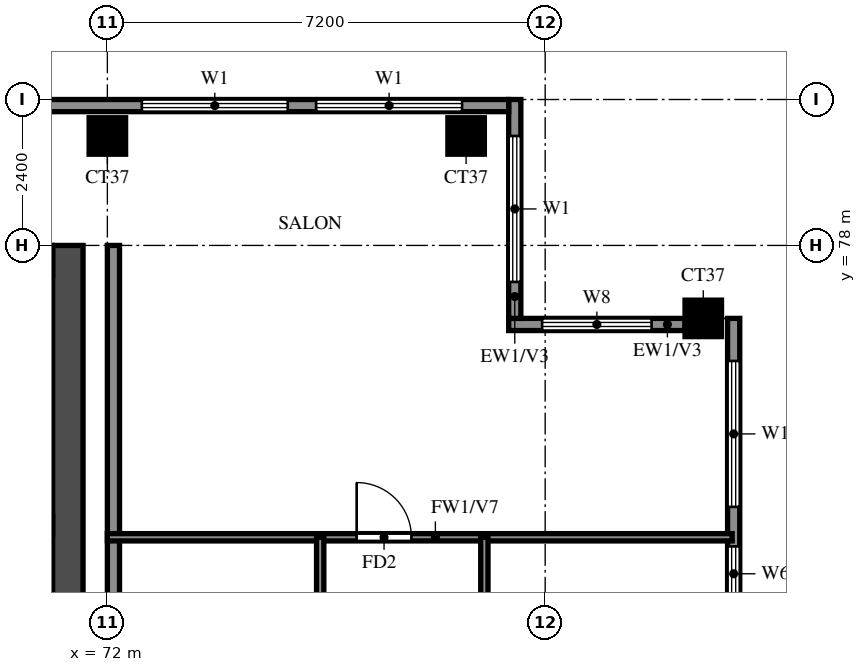
"""IFC4 building model, lengths in metres.
Left out: names, types, materials, properties, quantities, classifications, styles, units other than length and angle.
Written with IfcOpenShell. Run it as: python <this file> out.ifc"""

import sys

from ifc_helpers import new_model, si_unit, direction, frame, frame_2d, origin, origin_2d, place, context, subcontext, project, spatial, rectangle, extrude, source, transform, mapped, element, fill, save


model = new_model("IFC4")
c1 = context("Model", 3, precision=1e-05, world=origin(), true_north=direction((0.0, 1.0)))
c2 = subcontext(c1, "Body", "Model", "MODEL_VIEW")
j1 = project(units=[si_unit("LENGTHUNIT", "METRE"), si_unit("PLANEANGLEUNIT", "RADIAN")], contexts=[c1])
p1 = place(None, origin())
s1 = spatial("IfcSite", under=j1, at=p1, CompositionType="ELEMENT")
p2 = place(p1, origin())
s2 = spatial("IfcBuilding", under=s1, at=p2, CompositionType="ELEMENT")
p3 = place(p2, frame((0.0, 0.0, 253.5)))
s3 = spatial("IfcBuildingStorey", under=s2, at=p3, CompositionType="ELEMENT", Elevation=253.5)
m1 = source(origin(), c2, "Body", "SweptSolid", [
    extrude(rectangle(XDim=0.6, YDim=0.6, at=origin_2d()), origin(), (0.0, 0.0, 1.0), 3.22),
])
for number, where, z_axis, x_axis in (
    (1, (81.8, 76.8, 0.0), (0.0, 0.0, 1.0), (1.0, 0.0, 0.0)),
    (2, (72.0, 79.8, 0.0), (0.0, 0.0, 1.0), (1.0, 0.0, 0.0)),
    (3, (77.9, 79.8, 0.0), (0.0, 0.0, 1.0), (1.0, 0.0, 0.0)),
):
    element("IfcColumn", number, at=place(p3, frame(where, z_axis=z_axis, x_axis=x_axis)), inside=s3, PredefinedType="COLUMN", context=c2, shape_type="MappedRepresentation", body=[
        mapped(m1, transform((0.0, 0.0, 0.0))),
    ])
p4 = place(p3, frame((71.35, 66.15, 0.0), z_axis=(0.0, 0.0, 1.0), x_axis=(0.0, 1.0, 0.0)))
e4 = element("IfcWall", 4, at=p4, inside=s3, PredefinedType="SHEAR", context=c2, shape_type="SweptSolid", body=[
    extrude(rectangle(XDim=11.85, YDim=0.5, at=frame_2d((5.925, 0.0))), origin(), (0.0, 0.0, 1.0), 3.22),
])
p5 = place(p3, frame((29.7, 77.75, 0.0), z_axis=(0.0, 0.0, 1.0), x_axis=(1.0, 0.0, 0.0)))
e5 = element("IfcWall", 5, at=p5, inside=s3, PredefinedType="SHEAR", context=c2, shape_type="SweptSolid", body=[
    extrude(rectangle(XDim=41.4, YDim=0.5, at=frame_2d((20.7, 0.0))), origin(), (0.0, 0.0, 1.0), 3.22),
])
p6 = place(p3, frame((82.3, 48.2, 0.0), z_axis=(0.0, 0.0, 1.0), x_axis=(0.0, 1.0, 0.0)))
e6 = element("IfcWall", 6, at=p6, inside=s3, PredefinedType="SOLIDWALL", context=c2, shape_type="SweptSolid", body=[
    extrude(rectangle(XDim=28.6, YDim=0.2, at=frame_2d((14.3, 0.0))), origin(), (0.0, 0.0, 1.0), 3.22),
])
p7 = place(p6, frame((4.3, 0.0, 0.0)))
e7 = element("IfcOpeningElement", 7, at=p7, cuts=e6, PredefinedType="OPENING", context=c2, shape_type="SweptSolid", body=[
    extrude(rectangle(XDim=1.8, YDim=2.4, at=frame_2d((0.9, 1.2))), frame((0.0, 0.11, 0.0), z_axis=(0.0, -1.0, 0.0), x_axis=(1.0, 0.0, 0.0)), (0.0, 0.0, 1.0), 0.22),
])
p8 = place(p6, frame((18.7, 0.0, 0.0)))
e8 = element("IfcOpeningElement", 8, at=p8, cuts=e6, PredefinedType="OPENING", context=c2, shape_type="SweptSolid", body=[
    extrude(rectangle(XDim=1.8, YDim=2.4, at=frame_2d((0.9, 1.2))), frame((0.0, 0.11, 0.0), z_axis=(0.0, -1.0, 0.0), x_axis=(1.0, 0.0, 0.0)), (0.0, 0.0, 1.0), 0.22),
])
p9 = place(p6, frame((0.6, 0.0, 0.6)))
e9 = element("IfcOpeningElement", 9, at=p9, cuts=e6, PredefinedType="OPENING", context=c2, shape_type="SweptSolid", body=[
    extrude(rectangle(XDim=1.2, YDim=2.4, at=frame_2d((0.6, 1.2))), frame((0.0, 0.11, 0.0), z_axis=(0.0, -1.0, 0.0), x_axis=(1.0, 0.0, 0.0)), (0.0, 0.0, 1.0), 0.22),
])
p10 = place(p6, frame((7.3, 0.0, 0.6)))
e10 = element("IfcOpeningElement", 10, at=p10, cuts=e6, PredefinedType="OPENING", context=c2, shape_type="SweptSolid", body=[
    extrude(rectangle(XDim=1.2, YDim=2.4, at=frame_2d((0.6, 1.2))), frame((0.0, 0.11, 0.0), z_axis=(0.0, -1.0, 0.0), x_axis=(1.0, 0.0, 0.0)), (0.0, 0.0, 1.0), 0.22),
])
p11 = place(p6, frame((10.6, 0.0, 0.6)))
e11 = element("IfcOpeningElement", 11, at=p11, cuts=e6, PredefinedType="OPENING", context=c2, shape_type="SweptSolid", body=[
    extrude(rectangle(XDim=2.4, YDim=2.4, at=frame_2d((1.2, 1.2))), frame((0.0, 0.11, 0.0), z_axis=(0.0, -1.0, 0.0), x_axis=(1.0, 0.0, 0.0)), (0.0, 0.0, 1.0), 0.22),
])
p12 = place(p6, frame((14.5, 0.0, 0.6)))
e12 = element("IfcOpeningElement", 12, at=p12, cuts=e6, PredefinedType="OPENING", context=c2, shape_type="SweptSolid", body=[
    extrude(rectangle(XDim=1.8, YDim=2.4, at=frame_2d((0.9, 1.2))), frame((0.0, 0.11, 0.0), z_axis=(0.0, -1.0, 0.0), x_axis=(1.0, 0.0, 0.0)), (0.0, 0.0, 1.0), 0.22),
])
p13 = place(p6, frame((21.85, 0.0, 1.5)))
e13 = element("IfcOpeningElement", 13, at=p13, cuts=e6, PredefinedType="OPENING", context=c2, shape_type="SweptSolid", body=[
    extrude(rectangle(XDim=0.9, YDim=0.9, at=frame_2d((0.45, 0.45))), frame((0.0, 0.11, 0.0), z_axis=(0.0, -1.0, 0.0), x_axis=(1.0, 0.0, 0.0)), (0.0, 0.0, 1.0), 0.22),
])
p14 = place(p6, frame((23.95, 0.0, 1.5)))
e14 = element("IfcOpeningElement", 14, at=p14, cuts=e6, PredefinedType="OPENING", context=c2, shape_type="SweptSolid", body=[
    extrude(rectangle(XDim=0.9, YDim=0.9, at=frame_2d((0.45, 0.45))), frame((0.0, 0.11, 0.0), z_axis=(0.0, -1.0, 0.0), x_axis=(1.0, 0.0, 0.0)), (0.0, 0.0, 1.0), 0.22),
])
p15 = place(p6, frame((25.5, 0.0, 0.6)))
e15 = element("IfcOpeningElement", 15, at=p15, cuts=e6, PredefinedType="OPENING", context=c2, shape_type="SweptSolid", body=[
    extrude(rectangle(XDim=2.4, YDim=2.4, at=frame_2d((1.2, 1.2))), frame((0.0, 0.11, 0.0), z_axis=(0.0, -1.0, 0.0), x_axis=(1.0, 0.0, 0.0)), (0.0, 0.0, 1.0), 0.22),
])
p16 = place(p3, frame((81.5, 76.7, 0.0), z_axis=(0.0, 0.0, 1.0), x_axis=(-1.0, 0.0, 0.0)))
e16 = element("IfcWall", 16, at=p16, inside=s3, PredefinedType="SOLIDWALL", context=c2, shape_type="SweptSolid", body=[
    extrude(rectangle(XDim=2.9, YDim=0.2, at=frame_2d((1.45, 0.0))), origin(), (0.0, 0.0, 1.0), 3.22),
])
p17 = place(p16, frame((0.55, 0.0, 0.6)))
e17 = element("IfcOpeningElement", 17, at=p17, cuts=e16, PredefinedType="OPENING", context=c2, shape_type="SweptSolid", body=[
    extrude(rectangle(XDim=1.8, YDim=2.4, at=frame_2d((0.9, 1.2))), frame((0.0, 0.11, 0.0), z_axis=(0.0, -1.0, 0.0), x_axis=(1.0, 0.0, 0.0)), (0.0, 0.0, 1.0), 0.22),
])
p18 = place(p3, frame((78.7, 76.8, 0.0), z_axis=(0.0, 0.0, 1.0), x_axis=(0.0, 1.0, 0.0)))
e18 = element("IfcWall", 18, at=p18, inside=s3, PredefinedType="SOLIDWALL", context=c2, shape_type="SweptSolid", body=[
    extrude(rectangle(XDim=3.6, YDim=0.2, at=frame_2d((1.8, 0.0))), origin(), (0.0, 0.0, 1.0), 3.22),
])
p19 = place(p18, frame((0.6, 0.0, 0.6)))
e19 = element("IfcOpeningElement", 19, at=p19, cuts=e18, PredefinedType="OPENING", context=c2, shape_type="SweptSolid", body=[
    extrude(rectangle(XDim=2.4, YDim=2.4, at=frame_2d((1.2, 1.2))), frame((0.0, 0.11, 0.0), z_axis=(0.0, -1.0, 0.0), x_axis=(1.0, 0.0, 0.0)), (0.0, 0.0, 1.0), 0.22),
])
p20 = place(p3, frame((78.6, 80.3, 0.0), z_axis=(0.0, 0.0, 1.0), x_axis=(-1.0, 0.0, 0.0)))
e20 = element("IfcWall", 20, at=p20, inside=s3, PredefinedType="SOLIDWALL", context=c2, shape_type="SweptSolid", body=[
    extrude(rectangle(XDim=56.6, YDim=0.2, at=frame_2d((28.3, 0.0))), origin(), (0.0, 0.0, 1.0), 3.22),
])
p21 = place(p20, frame((50.433, 0.0, 0.6)))
e21 = element("IfcOpeningElement", 21, at=p21, cuts=e20, PredefinedType="OPENING", context=c2, shape_type="SweptSolid", body=[
    extrude(rectangle(XDim=2.4, YDim=2.4, at=frame_2d((1.2, 1.2))), frame((0.0, 0.11, 0.0), z_axis=(0.0, -1.0, 0.0), x_axis=(1.0, 0.0, 0.0)), (0.0, 0.0, 1.0), 0.22),
])
p22 = place(p20, frame((53.367, 0.0, 0.6)))
e22 = element("IfcOpeningElement", 22, at=p22, cuts=e20, PredefinedType="OPENING", context=c2, shape_type="SweptSolid", body=[
    extrude(rectangle(XDim=2.4, YDim=2.4, at=frame_2d((1.2, 1.2))), frame((0.0, 0.11, 0.0), z_axis=(0.0, -1.0, 0.0), x_axis=(1.0, 0.0, 0.0)), (0.0, 0.0, 1.0), 0.22),
])
p23 = place(p20, frame((0.767, 0.0, 0.6)))
e23 = element("IfcOpeningElement", 23, at=p23, cuts=e20, PredefinedType="OPENING", context=c2, shape_type="SweptSolid", body=[
    extrude(rectangle(XDim=2.4, YDim=2.4, at=frame_2d((1.2, 1.2))), frame((0.0, 0.11, 0.0), z_axis=(0.0, -1.0, 0.0), x_axis=(1.0, 0.0, 0.0)), (0.0, 0.0, 1.0), 0.22),
])
p24 = place(p20, frame((3.633, 0.0, 0.6)))
e24 = element("IfcOpeningElement", 24, at=p24, cuts=e20, PredefinedType="OPENING", context=c2, shape_type="SweptSolid", body=[
    extrude(rectangle(XDim=2.4, YDim=2.4, at=frame_2d((1.2, 1.2))), frame((0.0, 0.11, 0.0), z_axis=(0.0, -1.0, 0.0), x_axis=(1.0, 0.0, 0.0)), (0.0, 0.0, 1.0), 0.22),
])
p25 = place(p3, frame((72.1, 62.4, 0.0), z_axis=(0.0, 0.0, 1.0), x_axis=(0.0, 1.0, 0.0)))
e25 = element("IfcWall", 25, at=p25, inside=s3, PredefinedType="SOLIDWALL", context=c2, shape_type="SweptSolid", body=[
    extrude(rectangle(XDim=15.6, YDim=0.2, at=frame_2d((7.8, 0.0))), origin(), (0.0, 0.0, 1.0), 3.22),
])
p26 = place(p3, frame((72.0, 73.2, 0.0), z_axis=(0.0, 0.0, 1.0), x_axis=(1.0, 0.0, 0.0)))
e26 = element("IfcWall", 26, at=p26, inside=s3, PredefinedType="PARTITIONING", context=c2, shape_type="SweptSolid", body=[
    extrude(rectangle(XDim=10.275, YDim=0.12, at=frame_2d((5.137, 0.0))), origin(), (0.0, 0.0, 1.0), 2.32),
])
p27 = place(p26, frame((4.1, 0.0, 0.0)))
e27 = element("IfcOpeningElement", 27, at=p27, cuts=e26, PredefinedType="OPENING", context=c2, shape_type="SweptSolid", body=[
    extrude(rectangle(XDim=0.9, YDim=2.1, at=frame_2d((0.45, 1.05))), frame((0.0, 0.07, 0.0), z_axis=(0.0, -1.0, 0.0), x_axis=(1.0, 0.0, 0.0)), (0.0, 0.0, 1.0), 0.14),
])
p28 = place(p3, frame((75.5, 64.8, 0.0), z_axis=(0.0, 0.0, 1.0), x_axis=(0.0, 1.0, 0.0)))
e28 = element("IfcWall", 28, at=p28, inside=s3, PredefinedType="PARTITIONING", context=c2, shape_type="SweptSolid", body=[
    extrude(rectangle(XDim=8.4, YDim=0.12, at=frame_2d((4.2, 0.0))), origin(), (0.0, 0.0, 1.0), 3.22),
])
p29 = place(p28, frame((5.1, 0.0, 0.0)))
e29 = element("IfcOpeningElement", 29, at=p29, cuts=e28, PredefinedType="OPENING", context=c2, shape_type="SweptSolid", body=[
    extrude(rectangle(XDim=0.9, YDim=2.1, at=frame_2d((0.45, 1.05))), frame((0.0, 0.07, 0.0), z_axis=(0.0, -1.0, 0.0), x_axis=(1.0, 0.0, 0.0)), (0.0, 0.0, 1.0), 0.14),
])
p30 = place(p3, frame((78.2, 69.6, 0.0), z_axis=(0.0, 0.0, 1.0), x_axis=(0.0, 1.0, 0.0)))
e30 = element("IfcWall", 30, at=p30, inside=s3, PredefinedType="PARTITIONING", context=c2, shape_type="SweptSolid", body=[
    extrude(rectangle(XDim=3.6, YDim=0.12, at=frame_2d((1.8, 0.0))), origin(), (0.0, 0.0, 1.0), 3.22),
])
p31 = place(p14, origin())
e31 = element("IfcWindow", 31, at=p31, inside=s3, PartitioningType="SINGLE_PANEL", PredefinedType="WINDOW", context=c2, shape_type="SweptSolid", body=[
    extrude(rectangle(XDim=0.9, YDim=0.9, at=frame_2d((0.45, 0.45))), frame((0.0, 0.03, 0.0), z_axis=(0.0, -1.0, 0.0), x_axis=(1.0, 0.0, 0.0)), (0.0, 0.0, 1.0), 0.06),
])
fill(e14, e31)
p32 = place(p15, origin())
e32 = element("IfcWindow", 32, at=p32, inside=s3, PartitioningType="DOUBLE_PANEL_VERTICAL", PredefinedType="WINDOW", context=c2, shape_type="SweptSolid", body=[
    extrude(rectangle(XDim=2.4, YDim=2.4, at=frame_2d((1.2, 1.2))), frame((0.0, 0.03, 0.0), z_axis=(0.0, -1.0, 0.0), x_axis=(1.0, 0.0, 0.0)), (0.0, 0.0, 1.0), 0.06),
])
fill(e15, e32)
p33 = place(p17, origin())
e33 = element("IfcWindow", 33, at=p33, inside=s3, PartitioningType="DOUBLE_PANEL_VERTICAL", PredefinedType="WINDOW", context=c2, shape_type="SweptSolid", body=[
    extrude(rectangle(XDim=1.8, YDim=2.4, at=frame_2d((0.9, 1.2))), frame((0.0, 0.03, 0.0), z_axis=(0.0, -1.0, 0.0), x_axis=(1.0, 0.0, 0.0)), (0.0, 0.0, 1.0), 0.06),
])
fill(e17, e33)
p34 = place(p19, origin())
e34 = element("IfcWindow", 34, at=p34, inside=s3, PartitioningType="DOUBLE_PANEL_VERTICAL", PredefinedType="WINDOW", context=c2, shape_type="SweptSolid", body=[
    extrude(rectangle(XDim=2.4, YDim=2.4, at=frame_2d((1.2, 1.2))), frame((0.0, 0.03, 0.0), z_axis=(0.0, -1.0, 0.0), x_axis=(1.0, 0.0, 0.0)), (0.0, 0.0, 1.0), 0.06),
])
fill(e19, e34)
p35 = place(p23, origin())
e35 = element("IfcWindow", 35, at=p35, inside=s3, PartitioningType="DOUBLE_PANEL_VERTICAL", PredefinedType="WINDOW", context=c2, shape_type="SweptSolid", body=[
    extrude(rectangle(XDim=2.4, YDim=2.4, at=frame_2d((1.2, 1.2))), frame((0.0, 0.03, 0.0), z_axis=(0.0, -1.0, 0.0), x_axis=(1.0, 0.0, 0.0)), (0.0, 0.0, 1.0), 0.06),
])
fill(e23, e35)
p36 = place(p24, origin())
e36 = element("IfcWindow", 36, at=p36, inside=s3, PartitioningType="DOUBLE_PANEL_VERTICAL", PredefinedType="WINDOW", context=c2, shape_type="SweptSolid", body=[
    extrude(rectangle(XDim=2.4, YDim=2.4, at=frame_2d((1.2, 1.2))), frame((0.0, 0.03, 0.0), z_axis=(0.0, -1.0, 0.0), x_axis=(1.0, 0.0, 0.0)), (0.0, 0.0, 1.0), 0.06),
])
fill(e24, e36)
p37 = place(p27, origin())
e37 = element("IfcDoor", 37, at=p37, inside=s3, OperationType="SINGLE_SWING_LEFT", PredefinedType="DOOR", context=c2, shape_type="SweptSolid", body=[
    extrude(rectangle(XDim=0.9, YDim=2.1, at=frame_2d((0.45, 1.05))), frame((0.0, 0.025, 0.0), z_axis=(0.0, -1.0, 0.0), x_axis=(1.0, 0.0, 0.0)), (0.0, 0.0, 1.0), 0.05),
])
fill(e27, e37)
save(model, sys.argv[1])
